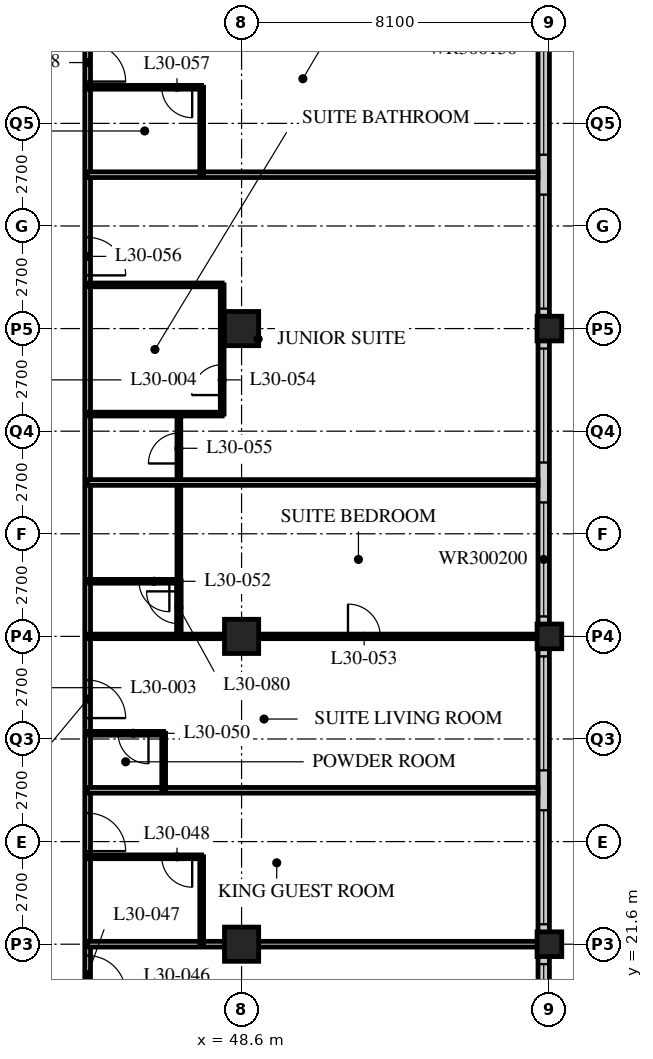
"""IFC4 building model, lengths in metres.
Left out: names, types, materials, properties, quantities, classifications, styles, units other than length and angle.
Written with IfcOpenShell. Run it as: python <this file> out.ifc"""

import sys

from ifc_helpers import new_model, si_unit, direction, frame, frame_2d, origin, origin_2d, place, context, subcontext, project, spatial, rectangle, hollow_rectangle, extrude, element, fill, save


model = new_model("IFC4")
c1 = context("Model", 3, precision=1e-05, world=origin(), true_north=direction((0.0, 1.0)))
c2 = subcontext(c1, "Body", "Model", "MODEL_VIEW")
j1 = project(units=[si_unit("LENGTHUNIT", "METRE"), si_unit("PLANEANGLEUNIT", "RADIAN")], contexts=[c1])
p1 = place(None, origin())
s1 = spatial("IfcSite", under=j1, at=p1, CompositionType="ELEMENT")
p2 = place(p1, origin())
s2 = spatial("IfcBuilding", under=s1, at=p2, CompositionType="ELEMENT")
p3 = place(p2, frame((0.0, 0.0, 120.4)))
s3 = spatial("IfcBuildingStorey", under=s2, at=p3, CompositionType="ELEMENT", Elevation=120.4)
for number, where, z_axis, x_axis in (
    (1, (48.6, 21.6, 0.0), (0.0, 0.0, 1.0), (1.0, 0.0, 0.0)),
    (2, (48.6, 29.7, 0.0), (0.0, 0.0, 1.0), (1.0, 0.0, 0.0)),
    (3, (48.6, 37.8, 0.0), (0.0, 0.0, 1.0), (1.0, 0.0, 0.0)),
):
    element("IfcColumn", number, at=place(p3, frame(where, z_axis=z_axis, x_axis=x_axis)), inside=s3, PredefinedType="COLUMN", context=c2, shape_type="SweptSolid", body=[
        extrude(hollow_rectangle(XDim=0.9, YDim=0.9, WallThickness=0.09, at=origin_2d()), origin(), (0.0, 0.0, 1.0), 3.4),
    ])
for number, where, z_axis, x_axis in (
    (4, (56.7, 21.6, 0.0), (0.0, 0.0, 1.0), (1.0, 0.0, 0.0)),
    (5, (56.7, 29.7, 0.0), (0.0, 0.0, 1.0), (1.0, 0.0, 0.0)),
    (6, (56.7, 37.8, 0.0), (0.0, 0.0, 1.0), (1.0, 0.0, 0.0)),
):
    element("IfcColumn", number, at=place(p3, frame(where, z_axis=z_axis, x_axis=x_axis)), inside=s3, PredefinedType="COLUMN", context=c2, shape_type="SweptSolid", body=[
        extrude(hollow_rectangle(XDim=0.65, YDim=0.65, WallThickness=0.055, at=origin_2d()), origin(), (0.0, 0.0, 1.0), 3.4),
    ])
p4 = place(p3, frame((56.55, 13.8, 0.0), z_axis=(0.0, 0.0, 1.0), x_axis=(0.0, 1.0, 0.0)))
e7 = element("IfcWall", 7, at=p4, inside=s3, PredefinedType="SOLIDWALL", context=c2, shape_type="SweptSolid", body=[
    extrude(rectangle(XDim=32.1, YDim=0.3, at=frame_2d((16.05, 0.0))), origin(), (0.0, 0.0, 1.0), 3.19),
])
p5 = place(p4, frame((0.225, 0.0, 0.9)))
e8 = element("IfcOpeningElement", 8, at=p5, cuts=e7, PredefinedType="OPENING", context=c2, shape_type="SweptSolid", body=[
    extrude(rectangle(XDim=3.0, YDim=2.0, at=frame_2d((1.5, 1.0))), frame((0.0, 0.16, 0.0), z_axis=(0.0, -1.0, 0.0), x_axis=(1.0, 0.0, 0.0)), (0.0, 0.0, 1.0), 0.32),
])
p6 = place(p4, frame((4.275, 0.0, 0.9)))
e9 = element("IfcOpeningElement", 9, at=p6, cuts=e7, PredefinedType="OPENING", context=c2, shape_type="SweptSolid", body=[
    extrude(rectangle(XDim=3.0, YDim=2.0, at=frame_2d((1.5, 1.0))), frame((0.0, 0.16, 0.0), z_axis=(0.0, -1.0, 0.0), x_axis=(1.0, 0.0, 0.0)), (0.0, 0.0, 1.0), 0.32),
])
p7 = place(p4, frame((8.325, 0.0, 0.9)))
e10 = element("IfcOpeningElement", 10, at=p7, cuts=e7, PredefinedType="OPENING", context=c2, shape_type="SweptSolid", body=[
    extrude(rectangle(XDim=3.0, YDim=2.0, at=frame_2d((1.5, 1.0))), frame((0.0, 0.16, 0.0), z_axis=(0.0, -1.0, 0.0), x_axis=(1.0, 0.0, 0.0)), (0.0, 0.0, 1.0), 0.32),
])
p8 = place(p4, frame((12.375, 0.0, 0.9)))
e11 = element("IfcOpeningElement", 11, at=p8, cuts=e7, PredefinedType="OPENING", context=c2, shape_type="SweptSolid", body=[
    extrude(rectangle(XDim=3.0, YDim=2.0, at=frame_2d((1.5, 1.0))), frame((0.0, 0.16, 0.0), z_axis=(0.0, -1.0, 0.0), x_axis=(1.0, 0.0, 0.0)), (0.0, 0.0, 1.0), 0.32),
])
p9 = place(p4, frame((16.425, 0.0, 0.9)))
e12 = element("IfcOpeningElement", 12, at=p9, cuts=e7, PredefinedType="OPENING", context=c2, shape_type="SweptSolid", body=[
    extrude(rectangle(XDim=3.0, YDim=2.0, at=frame_2d((1.5, 1.0))), frame((0.0, 0.16, 0.0), z_axis=(0.0, -1.0, 0.0), x_axis=(1.0, 0.0, 0.0)), (0.0, 0.0, 1.0), 0.32),
])
p10 = place(p4, frame((20.475, 0.0, 0.9)))
e13 = element("IfcOpeningElement", 13, at=p10, cuts=e7, PredefinedType="OPENING", context=c2, shape_type="SweptSolid", body=[
    extrude(rectangle(XDim=3.0, YDim=2.0, at=frame_2d((1.5, 1.0))), frame((0.0, 0.16, 0.0), z_axis=(0.0, -1.0, 0.0), x_axis=(1.0, 0.0, 0.0)), (0.0, 0.0, 1.0), 0.32),
])
p11 = place(p4, frame((24.525, 0.0, 0.9)))
e14 = element("IfcOpeningElement", 14, at=p11, cuts=e7, PredefinedType="OPENING", context=c2, shape_type="SweptSolid", body=[
    extrude(rectangle(XDim=3.0, YDim=2.0, at=frame_2d((1.5, 1.0))), frame((0.0, 0.16, 0.0), z_axis=(0.0, -1.0, 0.0), x_axis=(1.0, 0.0, 0.0)), (0.0, 0.0, 1.0), 0.32),
])
p12 = place(p4, frame((28.575, 0.0, 0.9)))
e15 = element("IfcOpeningElement", 15, at=p12, cuts=e7, PredefinedType="OPENING", context=c2, shape_type="SweptSolid", body=[
    extrude(rectangle(XDim=3.0, YDim=2.0, at=frame_2d((1.5, 1.0))), frame((0.0, 0.16, 0.0), z_axis=(0.0, -1.0, 0.0), x_axis=(1.0, 0.0, 0.0)), (0.0, 0.0, 1.0), 0.32),
])
p13 = place(p3, frame((44.55, 17.55, 0.0), z_axis=(0.0, 0.0, 1.0), x_axis=(0.0, 1.0, 0.0)))
e16 = element("IfcWall", 16, at=p13, inside=s3, PredefinedType="PARTITIONING", context=c2, shape_type="SweptSolid", body=[
    extrude(rectangle(XDim=28.35, YDim=0.15, at=frame_2d((14.175, 0.0))), origin(), (0.0, 0.0, 1.0), 3.19),
])
p14 = place(p13, frame((2.75, 0.0, 0.0)))
e17 = element("IfcOpeningElement", 17, at=p14, cuts=e16, PredefinedType="OPENING", context=c2, shape_type="SweptSolid", body=[
    extrude(rectangle(XDim=1.0, YDim=2.1, at=frame_2d((0.5, 1.05))), frame((0.0, 0.085, 0.0), z_axis=(0.0, -1.0, 0.0), x_axis=(1.0, 0.0, 0.0)), (0.0, 0.0, 1.0), 0.17),
])
p15 = place(p13, frame((6.5, 0.0, 0.0)))
e18 = element("IfcOpeningElement", 18, at=p15, cuts=e16, PredefinedType="OPENING", context=c2, shape_type="SweptSolid", body=[
    extrude(rectangle(XDim=1.0, YDim=2.1, at=frame_2d((0.5, 1.05))), frame((0.0, 0.085, 0.0), z_axis=(0.0, -1.0, 0.0), x_axis=(1.0, 0.0, 0.0)), (0.0, 0.0, 1.0), 0.17),
])
p16 = place(p13, frame((10.0, 0.0, 0.0)))
e19 = element("IfcOpeningElement", 19, at=p16, cuts=e16, PredefinedType="OPENING", context=c2, shape_type="SweptSolid", body=[
    extrude(rectangle(XDim=1.0, YDim=2.1, at=frame_2d((0.5, 1.05))), frame((0.0, 0.085, 0.0), z_axis=(0.0, -1.0, 0.0), x_axis=(1.0, 0.0, 0.0)), (0.0, 0.0, 1.0), 0.17),
])
p17 = place(p13, frame((21.65, 0.0, 0.0)))
e20 = element("IfcOpeningElement", 20, at=p17, cuts=e16, PredefinedType="OPENING", context=c2, shape_type="SweptSolid", body=[
    extrude(rectangle(XDim=1.0, YDim=2.1, at=frame_2d((0.5, 1.05))), frame((0.0, 0.085, 0.0), z_axis=(0.0, -1.0, 0.0), x_axis=(1.0, 0.0, 0.0)), (0.0, 0.0, 1.0), 0.17),
])
p18 = place(p13, frame((26.75, 0.0, 0.0)))
e21 = element("IfcOpeningElement", 21, at=p18, cuts=e16, PredefinedType="OPENING", context=c2, shape_type="SweptSolid", body=[
    extrude(rectangle(XDim=1.0, YDim=2.1, at=frame_2d((0.5, 1.05))), frame((0.0, 0.085, 0.0), z_axis=(0.0, -1.0, 0.0), x_axis=(1.0, 0.0, 0.0)), (0.0, 0.0, 1.0), 0.17),
])
p19 = place(p3, frame((44.55, 21.6, 0.0), z_axis=(0.0, 0.0, 1.0), x_axis=(1.0, 0.0, 0.0)))
e22 = element("IfcWall", 22, at=p19, inside=s3, PredefinedType="PARTITIONING", context=c2, shape_type="SweptSolid", body=[
    extrude(rectangle(XDim=11.85, YDim=0.15, at=frame_2d((5.925, 0.0))), origin(), (0.0, 0.0, 1.0), 2.578),
])
p20 = place(p3, frame((47.55, 21.6, 0.0), z_axis=(0.0, 0.0, 1.0), x_axis=(0.0, 1.0, 0.0)))
e23 = element("IfcWall", 23, at=p20, inside=s3, PredefinedType="PARTITIONING", context=c2, shape_type="SweptSolid", body=[
    extrude(rectangle(XDim=2.3, YDim=0.1, at=frame_2d((1.15, 0.0))), origin(), (0.0, 0.0, 1.0), 3.19),
])
p21 = place(p3, frame((44.55, 23.9, 0.0), z_axis=(0.0, 0.0, 1.0), x_axis=(1.0, 0.0, 0.0)))
e24 = element("IfcWall", 24, at=p21, inside=s3, PredefinedType="PARTITIONING", context=c2, shape_type="SweptSolid", body=[
    extrude(rectangle(XDim=3.0, YDim=0.1, at=frame_2d((1.5, 0.0))), origin(), (0.0, 0.0, 1.0), 3.19),
])
p22 = place(p21, frame((1.95, 0.0, 0.0)))
e25 = element("IfcOpeningElement", 25, at=p22, cuts=e24, PredefinedType="OPENING", context=c2, shape_type="SweptSolid", body=[
    extrude(rectangle(XDim=0.8, YDim=2.1, at=frame_2d((0.4, 1.05))), frame((0.0, 0.06, 0.0), z_axis=(0.0, -1.0, 0.0), x_axis=(1.0, 0.0, 0.0)), (0.0, 0.0, 1.0), 0.12),
])
p23 = place(p3, frame((44.55, 25.65, 0.0), z_axis=(0.0, 0.0, 1.0), x_axis=(1.0, 0.0, 0.0)))
e26 = element("IfcWall", 26, at=p23, inside=s3, PredefinedType="PARTITIONING", context=c2, shape_type="SweptSolid", body=[
    extrude(rectangle(XDim=11.85, YDim=0.15, at=frame_2d((5.925, 0.0))), origin(), (0.0, 0.0, 1.0), 3.19),
])
p24 = place(p3, frame((46.55, 25.65, 0.0), z_axis=(0.0, 0.0, 1.0), x_axis=(0.0, 1.0, 0.0)))
e27 = element("IfcWall", 27, at=p24, inside=s3, PredefinedType="PARTITIONING", context=c2, shape_type="SweptSolid", body=[
    extrude(rectangle(XDim=1.5, YDim=0.1, at=frame_2d((0.75, 0.0))), origin(), (0.0, 0.0, 1.0), 3.19),
])
p25 = place(p3, frame((44.55, 27.15, 0.0), z_axis=(0.0, 0.0, 1.0), x_axis=(1.0, 0.0, 0.0)))
e28 = element("IfcWall", 28, at=p25, inside=s3, PredefinedType="PARTITIONING", context=c2, shape_type="SweptSolid", body=[
    extrude(rectangle(XDim=2.0, YDim=0.1, at=frame_2d((1.0, 0.0))), origin(), (0.0, 0.0, 1.0), 3.19),
])
p26 = place(p25, frame((0.8, 0.0, 0.0)))
e29 = element("IfcOpeningElement", 29, at=p26, cuts=e28, PredefinedType="OPENING", context=c2, shape_type="SweptSolid", body=[
    extrude(rectangle(XDim=0.8, YDim=2.1, at=frame_2d((0.4, 1.05))), frame((0.0, 0.06, 0.0), z_axis=(0.0, -1.0, 0.0), x_axis=(1.0, 0.0, 0.0)), (0.0, 0.0, 1.0), 0.12),
])
p27 = place(p3, frame((46.95, 31.15, 0.0), z_axis=(0.0, 0.0, 1.0), x_axis=(0.0, 1.0, 0.0)))
e30 = element("IfcWall", 30, at=p27, inside=s3, PredefinedType="PARTITIONING", context=c2, shape_type="SweptSolid", body=[
    extrude(rectangle(XDim=4.4, YDim=0.1, at=frame_2d((2.2, 0.0))), origin(), (0.0, 0.0, 1.0), 3.19),
])
p28 = place(p27, frame((3.1, 0.0, 0.0)))
e31 = element("IfcOpeningElement", 31, at=p28, cuts=e30, PredefinedType="OPENING", context=c2, shape_type="SweptSolid", body=[
    extrude(rectangle(XDim=0.8, YDim=2.1, at=frame_2d((0.4, 1.05))), frame((0.0, 0.06, 0.0), z_axis=(0.0, -1.0, 0.0), x_axis=(1.0, 0.0, 0.0)), (0.0, 0.0, 1.0), 0.12),
])
p29 = place(p3, frame((44.55, 31.15, 0.0), z_axis=(0.0, 0.0, 1.0), x_axis=(1.0, 0.0, 0.0)))
e32 = element("IfcWall", 32, at=p29, inside=s3, PredefinedType="PARTITIONING", context=c2, shape_type="SweptSolid", body=[
    extrude(rectangle(XDim=2.4, YDim=0.1, at=frame_2d((1.2, 0.0))), origin(), (0.0, 0.0, 1.0), 3.19),
])
p30 = place(p29, frame((1.35, 0.0, 0.0)))
e33 = element("IfcOpeningElement", 33, at=p30, cuts=e32, PredefinedType="OPENING", context=c2, shape_type="SweptSolid", body=[
    extrude(rectangle(XDim=0.8, YDim=2.1, at=frame_2d((0.4, 1.05))), frame((0.0, 0.06, 0.0), z_axis=(0.0, -1.0, 0.0), x_axis=(1.0, 0.0, 0.0)), (0.0, 0.0, 1.0), 0.12),
])
p31 = place(p3, frame((44.55, 29.7, 0.0), z_axis=(0.0, 0.0, 1.0), x_axis=(1.0, 0.0, 0.0)))
e34 = element("IfcWall", 34, at=p31, inside=s3, PredefinedType="PARTITIONING", context=c2, shape_type="SweptSolid", body=[
    extrude(rectangle(XDim=11.85, YDim=0.12, at=frame_2d((5.925, 0.0))), origin(), (0.0, 0.0, 1.0), 2.578),
])
p32 = place(p31, frame((6.85, 0.0, 0.0)))
e35 = element("IfcOpeningElement", 35, at=p32, cuts=e34, PredefinedType="OPENING", context=c2, shape_type="SweptSolid", body=[
    extrude(rectangle(XDim=0.85, YDim=2.1, at=frame_2d((0.425, 1.05))), frame((0.0, 0.07, 0.0), z_axis=(0.0, -1.0, 0.0), x_axis=(1.0, 0.0, 0.0)), (0.0, 0.0, 1.0), 0.14),
])
p33 = place(p3, frame((44.55, 33.75, 0.0), z_axis=(0.0, 0.0, 1.0), x_axis=(1.0, 0.0, 0.0)))
e36 = element("IfcWall", 36, at=p33, inside=s3, PredefinedType="PARTITIONING", context=c2, shape_type="SweptSolid", body=[
    extrude(rectangle(XDim=11.85, YDim=0.15, at=frame_2d((5.925, 0.0))), origin(), (0.0, 0.0, 1.0), 3.19),
])
p34 = place(p3, frame((48.09, 35.55, 0.0), z_axis=(0.0, 0.0, 1.0), x_axis=(0.0, 1.0, 0.0)))
e37 = element("IfcWall", 37, at=p34, inside=s3, PredefinedType="PARTITIONING", context=c2, shape_type="SweptSolid", body=[
    extrude(rectangle(XDim=3.4, YDim=0.1, at=frame_2d((1.7, 0.0))), origin(), (0.0, 0.0, 1.0), 3.19),
])
p35 = place(p34, frame((0.5, 0.0, 0.0)))
e38 = element("IfcOpeningElement", 38, at=p35, cuts=e37, PredefinedType="OPENING", context=c2, shape_type="SweptSolid", body=[
    extrude(rectangle(XDim=0.8, YDim=2.1, at=frame_2d((0.4, 1.05))), frame((0.0, 0.06, 0.0), z_axis=(0.0, -1.0, 0.0), x_axis=(1.0, 0.0, 0.0)), (0.0, 0.0, 1.0), 0.12),
])
for number, where, z_axis, x_axis in (
    (39, (44.55, 35.55, 0.0), (0.0, 0.0, 1.0), (1.0, 0.0, 0.0)),
    (40, (44.55, 38.95, 0.0), (0.0, 0.0, 1.0), (1.0, 0.0, 0.0)),
):
    element("IfcWall", number, at=place(p3, frame(where, z_axis=z_axis, x_axis=x_axis)), inside=s3, PredefinedType="PARTITIONING", context=c2, shape_type="SweptSolid", body=[
        extrude(rectangle(XDim=3.54, YDim=0.1, at=frame_2d((1.77, 0.0))), origin(), (0.0, 0.0, 1.0), 3.19),
    ])
p36 = place(p3, frame((44.55, 41.85, 0.0), z_axis=(0.0, 0.0, 1.0), x_axis=(1.0, 0.0, 0.0)))
e41 = element("IfcWall", 41, at=p36, inside=s3, PredefinedType="PARTITIONING", context=c2, shape_type="SweptSolid", body=[
    extrude(rectangle(XDim=11.85, YDim=0.15, at=frame_2d((5.925, 0.0))), origin(), (0.0, 0.0, 1.0), 3.19),
])
p37 = place(p3, frame((47.55, 41.85, 0.0), z_axis=(0.0, 0.0, 1.0), x_axis=(0.0, 1.0, 0.0)))
e42 = element("IfcWall", 42, at=p37, inside=s3, PredefinedType="PARTITIONING", context=c2, shape_type="SweptSolid", body=[
    extrude(rectangle(XDim=2.3, YDim=0.1, at=frame_2d((1.15, 0.0))), origin(), (0.0, 0.0, 1.0), 3.19),
])
p38 = place(p3, frame((44.55, 44.15, 0.0), z_axis=(0.0, 0.0, 1.0), x_axis=(1.0, 0.0, 0.0)))
e43 = element("IfcWall", 43, at=p38, inside=s3, PredefinedType="PARTITIONING", context=c2, shape_type="SweptSolid", body=[
    extrude(rectangle(XDim=3.0, YDim=0.1, at=frame_2d((1.5, 0.0))), origin(), (0.0, 0.0, 1.0), 3.19),
])
p39 = place(p38, frame((1.95, 0.0, 0.0)))
e44 = element("IfcOpeningElement", 44, at=p39, cuts=e43, PredefinedType="OPENING", context=c2, shape_type="SweptSolid", body=[
    extrude(rectangle(XDim=0.8, YDim=2.1, at=frame_2d((0.4, 1.05))), frame((0.0, 0.06, 0.0), z_axis=(0.0, -1.0, 0.0), x_axis=(1.0, 0.0, 0.0)), (0.0, 0.0, 1.0), 0.12),
])
p40 = place(p3, frame((46.95, 31.16, 0.0), z_axis=(0.0, 0.0, 1.0), x_axis=(0.0, -1.0, 0.0)))
e45 = element("IfcWall", 45, at=p40, inside=s3, PredefinedType="PARTITIONING", context=c2, shape_type="SweptSolid", body=[
    extrude(rectangle(XDim=1.46, YDim=0.12, at=frame_2d((0.73, 0.0))), origin(), (0.0, 0.0, 1.0), 3.19),
])
p41 = place(p40, frame((0.275, 0.0, 0.0)))
e46 = element("IfcOpeningElement", 46, at=p41, cuts=e45, PredefinedType="OPENING", context=c2, shape_type="SweptSolid", body=[
    extrude(rectangle(XDim=0.85, YDim=2.1, at=frame_2d((0.425, 1.05))), frame((0.0, 0.07, 0.0), z_axis=(0.0, -1.0, 0.0), x_axis=(1.0, 0.0, 0.0)), (0.0, 0.0, 1.0), 0.14),
])
p42 = place(p6, origin())
e47 = element("IfcWindow", 47, at=p42, inside=s3, PartitioningType="SINGLE_PANEL", PredefinedType="WINDOW", context=c2, shape_type="SweptSolid", body=[
    extrude(rectangle(XDim=3.0, YDim=2.0, at=frame_2d((1.5, 1.0))), frame((0.0, 0.03, 0.0), z_axis=(0.0, -1.0, 0.0), x_axis=(1.0, 0.0, 0.0)), (0.0, 0.0, 1.0), 0.06),
])
fill(e9, e47)
p43 = place(p7, origin())
e48 = element("IfcWindow", 48, at=p43, inside=s3, PartitioningType="SINGLE_PANEL", PredefinedType="WINDOW", context=c2, shape_type="SweptSolid", body=[
    extrude(rectangle(XDim=3.0, YDim=2.0, at=frame_2d((1.5, 1.0))), frame((0.0, 0.03, 0.0), z_axis=(0.0, -1.0, 0.0), x_axis=(1.0, 0.0, 0.0)), (0.0, 0.0, 1.0), 0.06),
])
fill(e10, e48)
p44 = place(p8, origin())
e49 = element("IfcWindow", 49, at=p44, inside=s3, PartitioningType="SINGLE_PANEL", PredefinedType="WINDOW", context=c2, shape_type="SweptSolid", body=[
    extrude(rectangle(XDim=3.0, YDim=2.0, at=frame_2d((1.5, 1.0))), frame((0.0, 0.03, 0.0), z_axis=(0.0, -1.0, 0.0), x_axis=(1.0, 0.0, 0.0)), (0.0, 0.0, 1.0), 0.06),
])
fill(e11, e49)
p45 = place(p9, origin())
e50 = element("IfcWindow", 50, at=p45, inside=s3, PartitioningType="SINGLE_PANEL", PredefinedType="WINDOW", context=c2, shape_type="SweptSolid", body=[
    extrude(rectangle(XDim=3.0, YDim=2.0, at=frame_2d((1.5, 1.0))), frame((0.0, 0.03, 0.0), z_axis=(0.0, -1.0, 0.0), x_axis=(1.0, 0.0, 0.0)), (0.0, 0.0, 1.0), 0.06),
])
fill(e12, e50)
p46 = place(p10, origin())
e51 = element("IfcWindow", 51, at=p46, inside=s3, PartitioningType="SINGLE_PANEL", PredefinedType="WINDOW", context=c2, shape_type="SweptSolid", body=[
    extrude(rectangle(XDim=3.0, YDim=2.0, at=frame_2d((1.5, 1.0))), frame((0.0, 0.03, 0.0), z_axis=(0.0, -1.0, 0.0), x_axis=(1.0, 0.0, 0.0)), (0.0, 0.0, 1.0), 0.06),
])
fill(e13, e51)
p47 = place(p11, origin())
e52 = element("IfcWindow", 52, at=p47, inside=s3, PartitioningType="SINGLE_PANEL", PredefinedType="WINDOW", context=c2, shape_type="SweptSolid", body=[
    extrude(rectangle(XDim=3.0, YDim=2.0, at=frame_2d((1.5, 1.0))), frame((0.0, 0.03, 0.0), z_axis=(0.0, -1.0, 0.0), x_axis=(1.0, 0.0, 0.0)), (0.0, 0.0, 1.0), 0.06),
])
fill(e14, e52)
p48 = place(p12, origin())
e53 = element("IfcWindow", 53, at=p48, inside=s3, PartitioningType="SINGLE_PANEL", PredefinedType="WINDOW", context=c2, shape_type="SweptSolid", body=[
    extrude(rectangle(XDim=3.0, YDim=2.0, at=frame_2d((1.5, 1.0))), frame((0.0, 0.03, 0.0), z_axis=(0.0, -1.0, 0.0), x_axis=(1.0, 0.0, 0.0)), (0.0, 0.0, 1.0), 0.06),
])
fill(e15, e53)
p49 = place(p14, origin())
e54 = element("IfcDoor", 54, at=p49, inside=s3, OperationType="SINGLE_SWING_RIGHT", PredefinedType="DOOR", context=c2, shape_type="SweptSolid", body=[
    extrude(rectangle(XDim=1.0, YDim=2.1, at=frame_2d((0.5, 1.05))), frame((0.0, 0.025, 0.0), z_axis=(0.0, -1.0, 0.0), x_axis=(1.0, 0.0, 0.0)), (0.0, 0.0, 1.0), 0.05),
])
fill(e17, e54)
p50 = place(p22, origin())
e55 = element("IfcDoor", 55, at=p50, inside=s3, OperationType="SINGLE_SWING_LEFT", PredefinedType="DOOR", context=c2, shape_type="SweptSolid", body=[
    extrude(rectangle(XDim=0.8, YDim=2.1, at=frame_2d((0.4, 1.05))), frame((0.0, 0.025, 0.0), z_axis=(0.0, -1.0, 0.0), x_axis=(1.0, 0.0, 0.0)), (0.0, 0.0, 1.0), 0.05),
])
fill(e25, e55)
p51 = place(p15, origin())
e56 = element("IfcDoor", 56, at=p51, inside=s3, OperationType="SINGLE_SWING_RIGHT", PredefinedType="DOOR", context=c2, shape_type="SweptSolid", body=[
    extrude(rectangle(XDim=1.0, YDim=2.1, at=frame_2d((0.5, 1.05))), frame((0.0, 0.025, 0.0), z_axis=(0.0, -1.0, 0.0), x_axis=(1.0, 0.0, 0.0)), (0.0, 0.0, 1.0), 0.05),
])
fill(e18, e56)
p52 = place(p26, origin())
e57 = element("IfcDoor", 57, at=p52, inside=s3, OperationType="SINGLE_SWING_LEFT", PredefinedType="DOOR", context=c2, shape_type="SweptSolid", body=[
    extrude(rectangle(XDim=0.8, YDim=2.1, at=frame_2d((0.4, 1.05))), frame((0.0, 0.025, 0.0), z_axis=(0.0, -1.0, 0.0), x_axis=(1.0, 0.0, 0.0)), (0.0, 0.0, 1.0), 0.05),
])
fill(e29, e57)
p53 = place(p16, origin())
e58 = element("IfcDoor", 58, at=p53, inside=s3, OperationType="SINGLE_SWING_RIGHT", PredefinedType="DOOR", context=c2, shape_type="SweptSolid", body=[
    extrude(rectangle(XDim=1.0, YDim=2.1, at=frame_2d((0.5, 1.05))), frame((0.0, 0.025, 0.0), z_axis=(0.0, -1.0, 0.0), x_axis=(1.0, 0.0, 0.0)), (0.0, 0.0, 1.0), 0.05),
])
fill(e19, e58)
p54 = place(p30, origin())
e59 = element("IfcDoor", 59, at=p54, inside=s3, OperationType="SINGLE_SWING_LEFT", PredefinedType="DOOR", context=c2, shape_type="SweptSolid", body=[
    extrude(rectangle(XDim=0.8, YDim=2.1, at=frame_2d((0.4, 1.05))), frame((0.0, 0.025, 0.0), z_axis=(0.0, -1.0, 0.0), x_axis=(1.0, 0.0, 0.0)), (0.0, 0.0, 1.0), 0.05),
])
fill(e33, e59)
p55 = place(p32, origin())
e60 = element("IfcDoor", 60, at=p55, inside=s3, OperationType="SINGLE_SWING_LEFT", PredefinedType="DOOR", context=c2, shape_type="SweptSolid", body=[
    extrude(rectangle(XDim=0.85, YDim=2.1, at=frame_2d((0.425, 1.05))), frame((0.0, 0.025, 0.0), z_axis=(0.0, -1.0, 0.0), x_axis=(1.0, 0.0, 0.0)), (0.0, 0.0, 1.0), 0.05),
])
fill(e35, e60)
p56 = place(p35, origin())
e61 = element("IfcDoor", 61, at=p56, inside=s3, OperationType="SINGLE_SWING_LEFT", PredefinedType="DOOR", context=c2, shape_type="SweptSolid", body=[
    extrude(rectangle(XDim=0.8, YDim=2.1, at=frame_2d((0.4, 1.05))), frame((0.0, 0.025, 0.0), z_axis=(0.0, -1.0, 0.0), x_axis=(1.0, 0.0, 0.0)), (0.0, 0.0, 1.0), 0.05),
])
fill(e38, e61)
p57 = place(p28, origin())
e62 = element("IfcDoor", 62, at=p57, inside=s3, OperationType="SINGLE_SWING_LEFT", PredefinedType="DOOR", context=c2, shape_type="SweptSolid", body=[
    extrude(rectangle(XDim=0.8, YDim=2.1, at=frame_2d((0.4, 1.05))), frame((0.0, 0.025, 0.0), z_axis=(0.0, -1.0, 0.0), x_axis=(1.0, 0.0, 0.0)), (0.0, 0.0, 1.0), 0.05),
])
fill(e31, e62)
p58 = place(p17, origin())
e63 = element("IfcDoor", 63, at=p58, inside=s3, OperationType="SINGLE_SWING_RIGHT", PredefinedType="DOOR", context=c2, shape_type="SweptSolid", body=[
    extrude(rectangle(XDim=1.0, YDim=2.1, at=frame_2d((0.5, 1.05))), frame((0.0, 0.025, 0.0), z_axis=(0.0, -1.0, 0.0), x_axis=(1.0, 0.0, 0.0)), (0.0, 0.0, 1.0), 0.05),
])
fill(e20, e63)
p59 = place(p39, origin())
e64 = element("IfcDoor", 64, at=p59, inside=s3, OperationType="SINGLE_SWING_LEFT", PredefinedType="DOOR", context=c2, shape_type="SweptSolid", body=[
    extrude(rectangle(XDim=0.8, YDim=2.1, at=frame_2d((0.4, 1.05))), frame((0.0, 0.025, 0.0), z_axis=(0.0, -1.0, 0.0), x_axis=(1.0, 0.0, 0.0)), (0.0, 0.0, 1.0), 0.05),
])
fill(e44, e64)
p60 = place(p18, origin())
e65 = element("IfcDoor", 65, at=p60, inside=s3, OperationType="SINGLE_SWING_RIGHT", PredefinedType="DOOR", context=c2, shape_type="SweptSolid", body=[
    extrude(rectangle(XDim=1.0, YDim=2.1, at=frame_2d((0.5, 1.05))), frame((0.0, 0.025, 0.0), z_axis=(0.0, -1.0, 0.0), x_axis=(1.0, 0.0, 0.0)), (0.0, 0.0, 1.0), 0.05),
])
fill(e21, e65)
p61 = place(p41, origin())
e66 = element("IfcDoor", 66, at=p61, inside=s3, OperationType="SINGLE_SWING_RIGHT", PredefinedType="DOOR", context=c2, shape_type="SweptSolid", body=[
    extrude(rectangle(XDim=0.85, YDim=2.1, at=frame_2d((0.425, 1.05))), frame((0.0, 0.025, 0.0), z_axis=(0.0, -1.0, 0.0), x_axis=(1.0, 0.0, 0.0)), (0.0, 0.0, 1.0), 0.05),
])
fill(e46, e66)
save(model, sys.argv[1])
